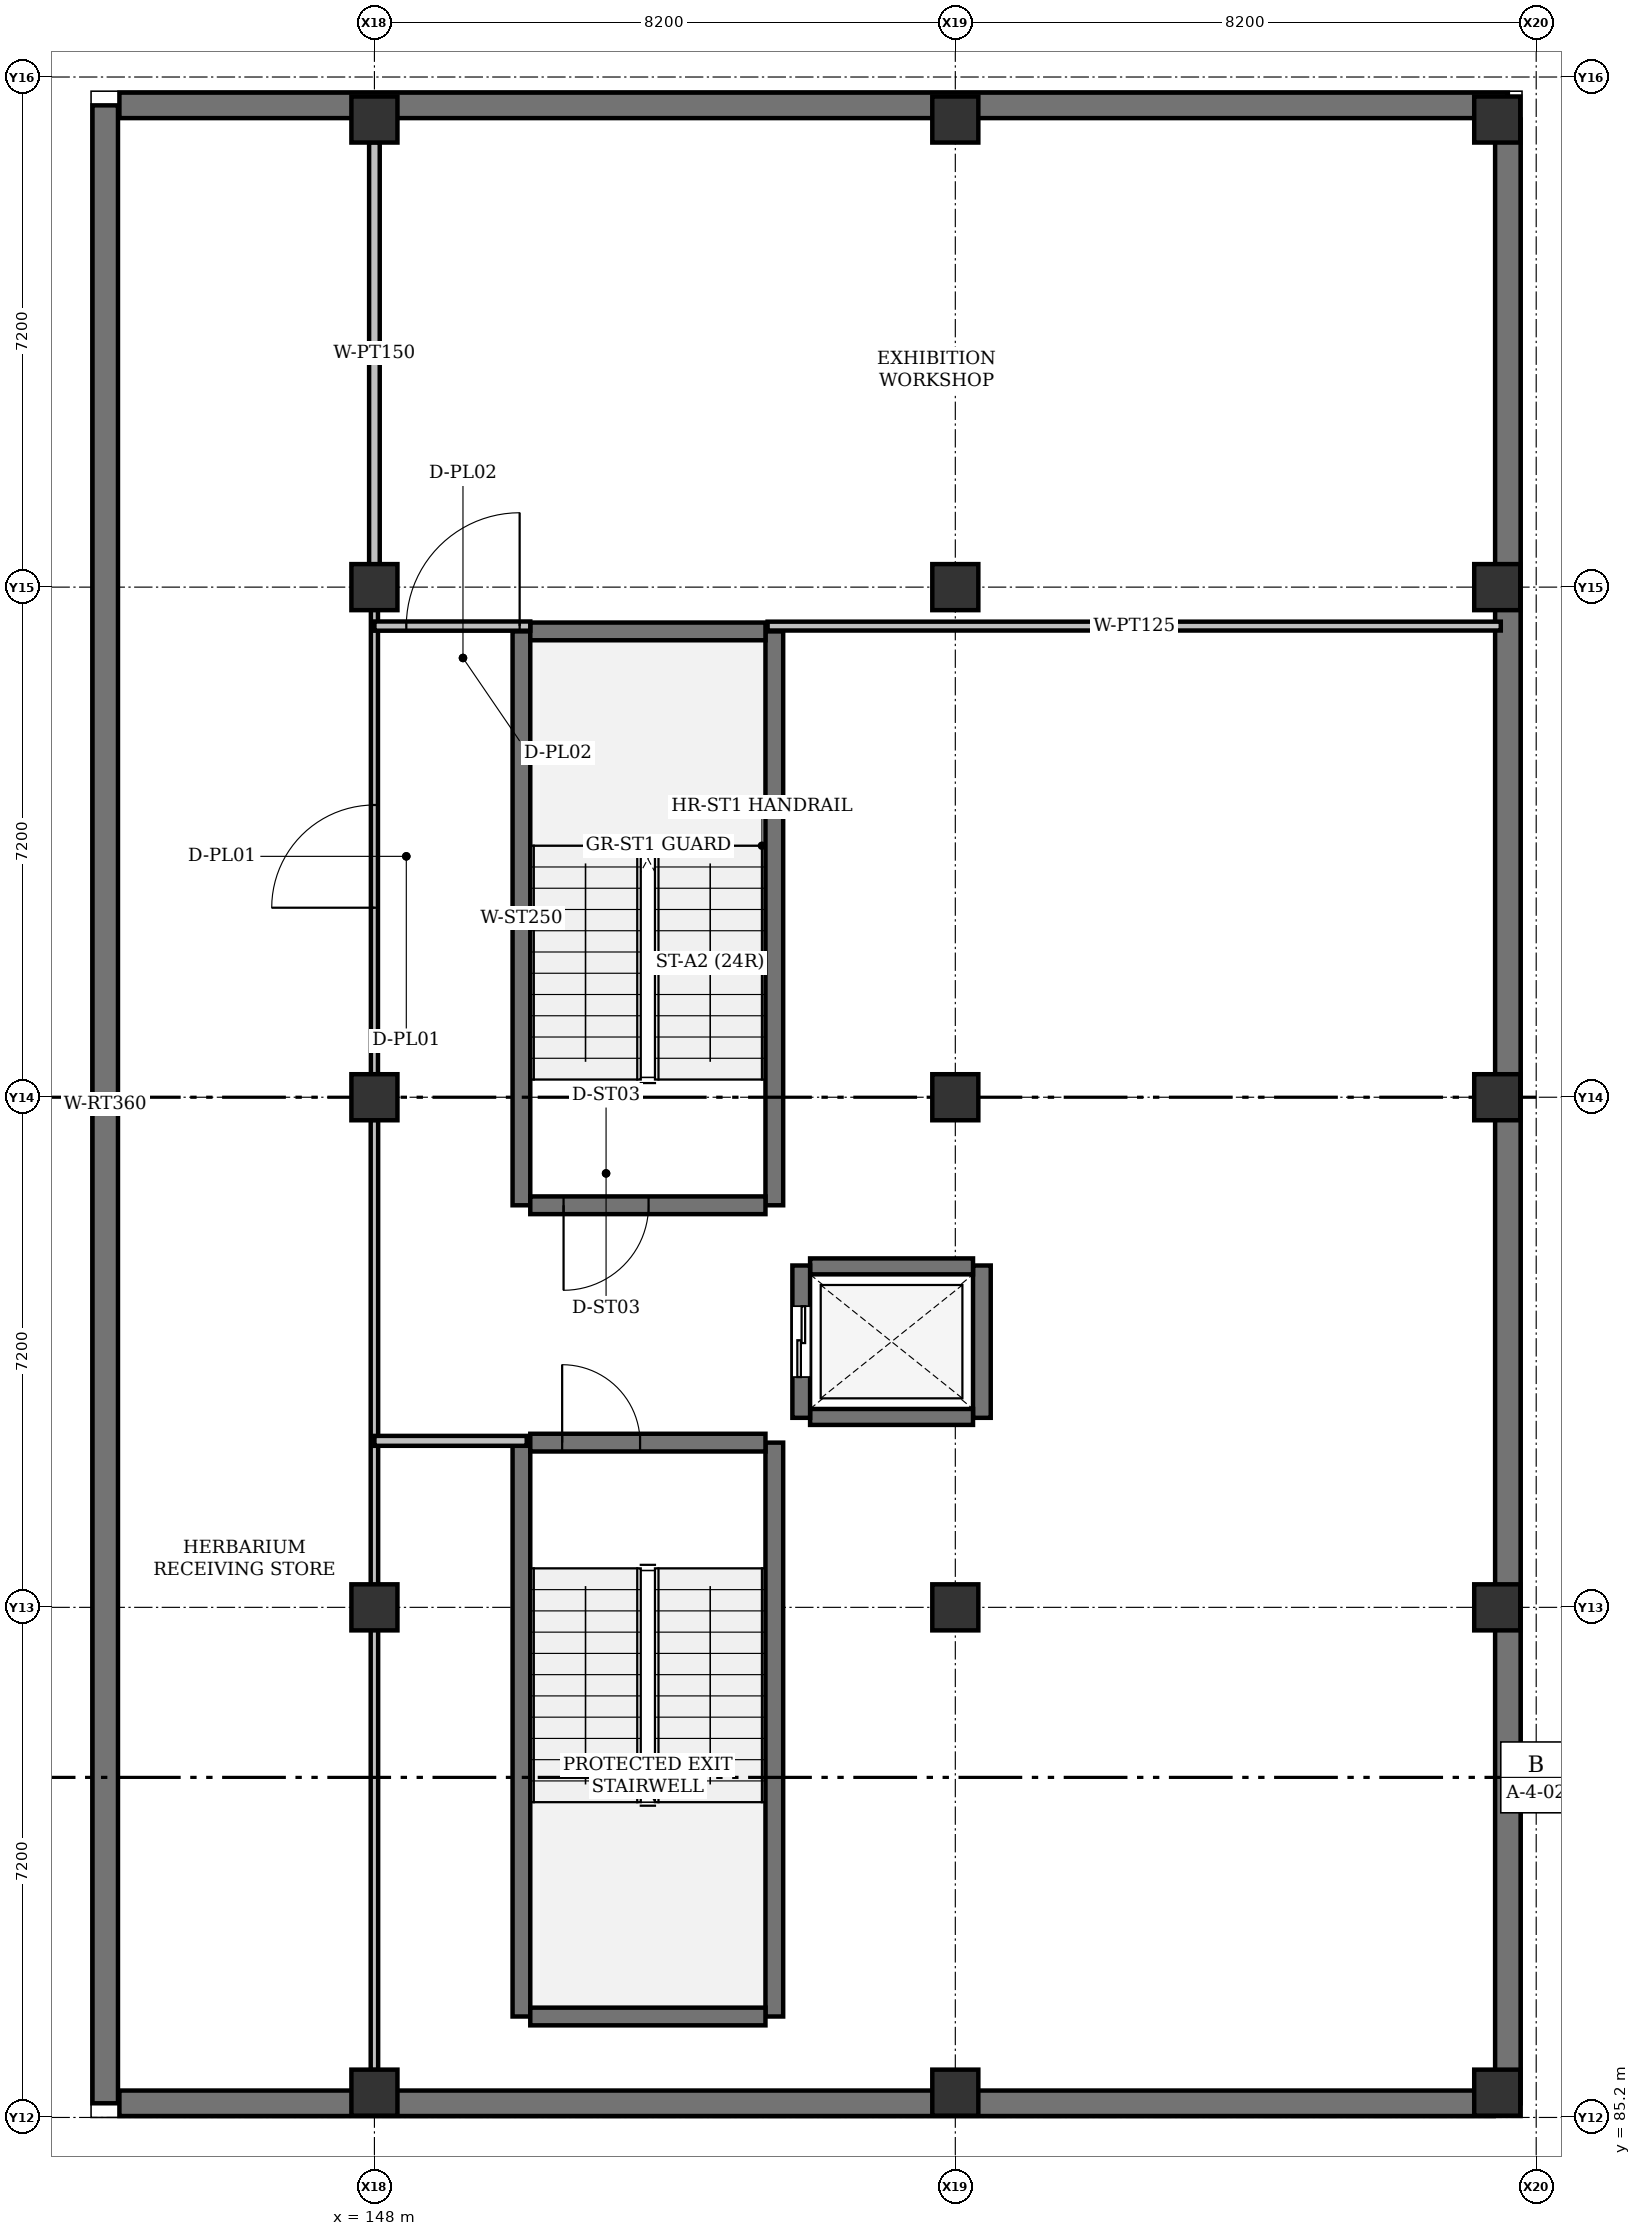
"""IFC4 building model, lengths in metres.
Left out: names, types, materials, properties, quantities, classifications, styles, units other than length and angle.
Written with IfcOpenShell. Run it as: python <this file> out.ifc"""

import sys

from ifc_helpers import new_model, si_unit, direction, frame, frame_2d, origin, origin_2d, place, context, subcontext, project, spatial, rectangle, extrude, element, fill, save


model = new_model("IFC4")
c1 = context("Model", 3, precision=1e-05, world=origin(), true_north=direction((0.0, 1.0)))
c2 = subcontext(c1, "Body", "Model", "MODEL_VIEW")
j1 = project(units=[si_unit("LENGTHUNIT", "METRE"), si_unit("PLANEANGLEUNIT", "RADIAN")], contexts=[c1])
p1 = place(None, origin())
s1 = spatial("IfcSite", under=j1, at=p1, CompositionType="ELEMENT")
p2 = place(p1, origin())
s2 = spatial("IfcBuilding", under=s1, at=p2, CompositionType="ELEMENT")
p3 = place(p2, frame((0.0, 0.0, -4.2)))
s3 = spatial("IfcBuildingStorey", under=s2, at=p3, CompositionType="ELEMENT", Elevation=-4.2)
for number, where, z_axis, x_axis in (
    (1, (148.0, 85.55, 0.0), (0.0, 0.0, 1.0), (1.0, 0.0, 0.0)),
    (2, (148.0, 92.4, 0.0), (0.0, 0.0, 1.0), (1.0, 0.0, 0.0)),
    (3, (148.0, 99.6, 0.0), (0.0, 0.0, 1.0), (1.0, 0.0, 0.0)),
    (4, (148.0, 106.8, 0.0), (0.0, 0.0, 1.0), (1.0, 0.0, 0.0)),
    (5, (148.0, 113.4, 0.0), (0.0, 0.0, 1.0), (1.0, 0.0, 0.0)),
    (6, (156.2, 85.55, 0.0), (0.0, 0.0, 1.0), (1.0, 0.0, 0.0)),
    (7, (156.2, 92.4, 0.0), (0.0, 0.0, 1.0), (1.0, 0.0, 0.0)),
    (8, (156.2, 99.6, 0.0), (0.0, 0.0, 1.0), (1.0, 0.0, 0.0)),
    (9, (156.2, 106.8, 0.0), (0.0, 0.0, 1.0), (1.0, 0.0, 0.0)),
    (10, (156.2, 113.4, 0.0), (0.0, 0.0, 1.0), (1.0, 0.0, 0.0)),
    (11, (163.85, 85.55, 0.0), (0.0, 0.0, 1.0), (1.0, 0.0, 0.0)),
    (12, (163.85, 92.4, 0.0), (0.0, 0.0, 1.0), (1.0, 0.0, 0.0)),
    (13, (163.85, 99.6, 0.0), (0.0, 0.0, 1.0), (1.0, 0.0, 0.0)),
    (14, (163.85, 106.8, 0.0), (0.0, 0.0, 1.0), (1.0, 0.0, 0.0)),
    (15, (163.85, 113.4, 0.0), (0.0, 0.0, 1.0), (1.0, 0.0, 0.0)),
):
    element("IfcColumn", number, at=place(p3, frame(where, z_axis=z_axis, x_axis=x_axis)), inside=s3, PredefinedType="COLUMN", context=c2, shape_type="SweptSolid", body=[
        extrude(rectangle(XDim=0.65, YDim=0.65, at=origin_2d()), origin(), (0.0, 0.0, 1.0), 4.2),
    ])
p4 = place(p3, frame((144.2, 85.4, 0.0), z_axis=(0.0, 0.0, 1.0), x_axis=(0.0, 1.0, 0.0)))
e16 = element("IfcWall", 16, at=p4, inside=s3, PredefinedType="USERDEFINED", context=c2, shape_type="SweptSolid", body=[
    extrude(rectangle(XDim=28.2, YDim=0.36, at=frame_2d((14.1, 0.0))), origin(), (0.0, 0.0, 1.0), 3.95),
])
p5 = place(p3, frame((144.4, 113.6, 0.0), z_axis=(0.0, 0.0, 1.0), x_axis=(1.0, 0.0, 0.0)))
e17 = element("IfcWall", 17, at=p5, inside=s3, PredefinedType="USERDEFINED", context=c2, shape_type="SweptSolid", body=[
    extrude(rectangle(XDim=19.6, YDim=0.36, at=frame_2d((9.8, 0.0))), origin(), (0.0, 0.0, 1.0), 3.95),
])
p6 = place(p3, frame((164.0, 113.4, 0.0), z_axis=(0.0, 0.0, 1.0), x_axis=(0.0, -1.0, 0.0)))
e18 = element("IfcWall", 18, at=p6, inside=s3, PredefinedType="USERDEFINED", context=c2, shape_type="SweptSolid", body=[
    extrude(rectangle(XDim=28.0, YDim=0.36, at=frame_2d((14.0, 0.0))), origin(), (0.0, 0.0, 1.0), 3.95),
])
p7 = place(p3, frame((163.8, 85.4, 0.0), z_axis=(0.0, 0.0, 1.0), x_axis=(-1.0, 0.0, 0.0)))
e19 = element("IfcWall", 19, at=p7, inside=s3, PredefinedType="USERDEFINED", context=c2, shape_type="SweptSolid", body=[
    extrude(rectangle(XDim=19.4, YDim=0.36, at=frame_2d((9.7, 0.0))), origin(), (0.0, 0.0, 1.0), 3.95),
])
for number, where, z_axis, x_axis in (
    (20, (150.075, 86.625, 0.0), (0.0, 0.0, 1.0), (0.0, 1.0, 0.0)),
    (21, (153.645, 86.625, 0.0), (0.0, 0.0, 1.0), (0.0, 1.0, 0.0)),
):
    element("IfcWall", number, at=place(p3, frame(where, z_axis=z_axis, x_axis=x_axis)), inside=s3, PredefinedType="SHEAR", context=c2, shape_type="SweptSolid", body=[
        extrude(rectangle(XDim=8.1, YDim=0.25, at=frame_2d((4.05, 0.0))), origin(), (0.0, 0.0, 1.0), 4.2),
    ])
p8 = place(p3, frame((150.2, 86.625, 0.0), z_axis=(0.0, 0.0, 1.0), x_axis=(1.0, 0.0, 0.0)))
e22 = element("IfcWall", 22, at=p8, inside=s3, PredefinedType="SHEAR", context=c2, shape_type="SweptSolid", body=[
    extrude(rectangle(XDim=3.32, YDim=0.25, at=frame_2d((1.66, 0.0))), origin(), (0.0, 0.0, 1.0), 4.2),
])
p9 = place(p3, frame((150.2, 94.725, 0.0), z_axis=(0.0, 0.0, 1.0), x_axis=(1.0, 0.0, 0.0)))
e23 = element("IfcWall", 23, at=p9, inside=s3, PredefinedType="SHEAR", context=c2, shape_type="SweptSolid", body=[
    extrude(rectangle(XDim=3.32, YDim=0.25, at=frame_2d((1.66, 0.0))), origin(), (0.0, 0.0, 1.0), 4.2),
])
p10 = place(p9, frame((0.45, 0.0, 0.0)))
e24 = element("IfcOpeningElement", 24, at=p10, cuts=e23, PredefinedType="OPENING", context=c2, shape_type="SweptSolid", body=[
    extrude(rectangle(XDim=1.1, YDim=2.15, at=frame_2d((0.55, 1.075))), frame((0.0, 0.125, 0.0), z_axis=(0.0, -1.0, 0.0), x_axis=(1.0, 0.0, 0.0)), (0.0, 0.0, 1.0), 0.25),
])
for number, where, z_axis, x_axis in (
    (25, (150.075, 98.075, 0.0), (0.0, 0.0, 1.0), (0.0, 1.0, 0.0)),
    (26, (153.645, 98.075, 0.0), (0.0, 0.0, 1.0), (0.0, 1.0, 0.0)),
):
    element("IfcWall", number, at=place(p3, frame(where, z_axis=z_axis, x_axis=x_axis)), inside=s3, PredefinedType="SHEAR", context=c2, shape_type="SweptSolid", body=[
        extrude(rectangle(XDim=8.1, YDim=0.25, at=frame_2d((4.05, 0.0))), origin(), (0.0, 0.0, 1.0), 4.2),
    ])
p11 = place(p3, frame((150.2, 106.175, 0.0), z_axis=(0.0, 0.0, 1.0), x_axis=(1.0, 0.0, 0.0)))
e27 = element("IfcWall", 27, at=p11, inside=s3, PredefinedType="SHEAR", context=c2, shape_type="SweptSolid", body=[
    extrude(rectangle(XDim=3.32, YDim=0.25, at=frame_2d((1.66, 0.0))), origin(), (0.0, 0.0, 1.0), 4.2),
])
p12 = place(p3, frame((153.52, 98.075, 0.0), z_axis=(0.0, 0.0, 1.0), x_axis=(-1.0, 0.0, 0.0)))
e28 = element("IfcWall", 28, at=p12, inside=s3, PredefinedType="SHEAR", context=c2, shape_type="SweptSolid", body=[
    extrude(rectangle(XDim=3.32, YDim=0.25, at=frame_2d((1.66, 0.0))), origin(), (0.0, 0.0, 1.0), 4.2),
])
p13 = place(p12, frame((1.65, 0.0, 0.0)))
e29 = element("IfcOpeningElement", 29, at=p13, cuts=e28, PredefinedType="OPENING", context=c2, shape_type="SweptSolid", body=[
    extrude(rectangle(XDim=1.2, YDim=2.2, at=frame_2d((0.6, 1.1))), frame((0.0, 0.125, 0.0), z_axis=(0.0, -1.0, 0.0), x_axis=(1.0, 0.0, 0.0)), (0.0, 0.0, 1.0), 0.25),
])
p14 = place(p3, frame((156.575, 95.075, 0.0), z_axis=(0.0, 0.0, 1.0), x_axis=(0.0, 1.0, 0.0)))
e30 = element("IfcWall", 30, at=p14, inside=s3, PredefinedType="SHEAR", context=c2, shape_type="SweptSolid", body=[
    extrude(rectangle(XDim=2.15, YDim=0.25, at=frame_2d((1.075, 0.0))), origin(), (0.0, 0.0, 1.0), 4.2),
])
for number, where, z_axis, x_axis in (
    (31, (154.15, 95.087, 0.0), (0.0, 0.0, 1.0), (1.0, 0.0, 0.0)),
    (32, (154.15, 97.212, 0.0), (0.0, 0.0, 1.0), (1.0, 0.0, 0.0)),
):
    element("IfcWall", number, at=place(p3, frame(where, z_axis=z_axis, x_axis=x_axis)), inside=s3, PredefinedType="SHEAR", context=c2, shape_type="SweptSolid", body=[
        extrude(rectangle(XDim=2.3, YDim=0.225, at=frame_2d((1.15, 0.0))), origin(), (0.0, 0.0, 1.0), 4.2),
    ])
p15 = place(p3, frame((154.025, 95.075, 0.0), z_axis=(0.0, 0.0, 1.0), x_axis=(0.0, 1.0, 0.0)))
e33 = element("IfcWall", 33, at=p15, inside=s3, PredefinedType="SHEAR", context=c2, shape_type="SweptSolid", body=[
    extrude(rectangle(XDim=2.15, YDim=0.25, at=frame_2d((1.075, 0.0))), origin(), (0.0, 0.0, 1.0), 4.2),
])
p16 = place(p15, frame((0.575, 0.0, 0.0)))
e34 = element("IfcOpeningElement", 34, at=p16, cuts=e33, PredefinedType="OPENING", context=c2, shape_type="SweptSolid", body=[
    extrude(rectangle(XDim=1.0, YDim=2.1, at=frame_2d((0.5, 1.05))), frame((0.0, 0.125, 0.0), z_axis=(0.0, -1.0, 0.0), x_axis=(1.0, 0.0, 0.0)), (0.0, 0.0, 1.0), 0.25),
])
p17 = place(p3, frame((148.0, 85.87, 0.0), z_axis=(0.0, 0.0, 1.0), x_axis=(0.0, 1.0, 0.0)))
e35 = element("IfcWall", 35, at=p17, inside=s3, PredefinedType="PARTITIONING", context=c2, shape_type="SweptSolid", body=[
    extrude(rectangle(XDim=13.41, YDim=0.105, at=frame_2d((6.705, 0.0))), origin(), (0.0, 0.0, 1.0), 3.401),
])
p18 = place(p3, frame((148.0, 99.92, 0.0), z_axis=(0.0, 0.0, 1.0), x_axis=(0.0, 1.0, 0.0)))
e36 = element("IfcWall", 36, at=p18, inside=s3, PredefinedType="PARTITIONING", context=c2, shape_type="SweptSolid", body=[
    extrude(rectangle(XDim=6.56, YDim=0.1, at=frame_2d((3.28, 0.0))), origin(), (0.0, 0.0, 1.0), 3.401),
])
p19 = place(p18, frame((2.355, 0.0, 0.0)))
e37 = element("IfcOpeningElement", 37, at=p19, cuts=e36, PredefinedType="OPENING", context=c2, shape_type="SweptSolid", body=[
    extrude(rectangle(XDim=1.45, YDim=2.2, at=frame_2d((0.725, 1.1))), frame((0.0, 0.05, 0.0), z_axis=(0.0, -1.0, 0.0), x_axis=(1.0, 0.0, 0.0)), (0.0, 0.0, 1.0), 0.1),
])
p20 = place(p3, frame((148.0, 107.12, 0.0), z_axis=(0.0, 0.0, 1.0), x_axis=(0.0, 1.0, 0.0)))
e38 = element("IfcWall", 38, at=p20, inside=s3, PredefinedType="PARTITIONING", context=c2, shape_type="SweptSolid", body=[
    extrude(rectangle(XDim=5.96, YDim=0.15, at=frame_2d((2.98, 0.0))), origin(), (0.0, 0.0, 1.0), 3.401),
])
p21 = place(p3, frame((148.0, 94.75, 0.0), z_axis=(0.0, 0.0, 1.0), x_axis=(1.0, 0.0, 0.0)))
e39 = element("IfcWall", 39, at=p21, inside=s3, PredefinedType="PARTITIONING", context=c2, shape_type="SweptSolid", body=[
    extrude(rectangle(XDim=2.15, YDim=0.14, at=frame_2d((1.075, 0.0))), origin(), (0.0, 0.0, 1.0), 3.401),
])
p22 = place(p3, frame((148.0, 106.25, 0.0), z_axis=(0.0, 0.0, 1.0), x_axis=(1.0, 0.0, 0.0)))
e40 = element("IfcWall", 40, at=p22, inside=s3, PredefinedType="PARTITIONING", context=c2, shape_type="SweptSolid", body=[
    extrude(rectangle(XDim=2.2, YDim=0.13, at=frame_2d((1.1, 0.0))), origin(), (0.0, 0.0, 1.0), 3.401),
])
p23 = place(p22, frame((0.45, 0.0, 0.0)))
e41 = element("IfcOpeningElement", 41, at=p23, cuts=e40, PredefinedType="OPENING", context=c2, shape_type="SweptSolid", body=[
    extrude(rectangle(XDim=1.6, YDim=2.25, at=frame_2d((0.8, 1.125))), frame((0.0, 0.065, 0.0), z_axis=(0.0, -1.0, 0.0), x_axis=(1.0, 0.0, 0.0)), (0.0, 0.0, 1.0), 0.13),
])
p24 = place(p3, frame((153.55, 106.25, 0.0), z_axis=(0.0, 0.0, 1.0), x_axis=(1.0, 0.0, 0.0)))
e42 = element("IfcWall", 42, at=p24, inside=s3, PredefinedType="PARTITIONING", context=c2, shape_type="SweptSolid", body=[
    extrude(rectangle(XDim=10.35, YDim=0.125, at=frame_2d((5.175, 0.0))), origin(), (0.0, 0.0, 1.0), 3.401),
])
p25 = place(p10, origin())
e43 = element("IfcDoor", 43, at=p25, inside=s3, OperationType="SINGLE_SWING_LEFT", PredefinedType="DOOR", context=c2, shape_type="SweptSolid", body=[
    extrude(rectangle(XDim=1.1, YDim=2.15, at=frame_2d((0.55, 1.075))), frame((0.0, 0.025, 0.0), z_axis=(0.0, -1.0, 0.0), x_axis=(1.0, 0.0, 0.0)), (0.0, 0.0, 1.0), 0.05),
])
fill(e24, e43)
p26 = place(p13, origin())
e44 = element("IfcDoor", 44, at=p26, inside=s3, OperationType="SINGLE_SWING_RIGHT", PredefinedType="DOOR", context=c2, shape_type="SweptSolid", body=[
    extrude(rectangle(XDim=1.2, YDim=2.2, at=frame_2d((0.6, 1.1))), frame((0.0, 0.025, 0.0), z_axis=(0.0, -1.0, 0.0), x_axis=(1.0, 0.0, 0.0)), (0.0, 0.0, 1.0), 0.05),
])
fill(e29, e44)
p27 = place(p16, origin())
e45 = element("IfcDoor", 45, at=p27, inside=s3, OperationType="SLIDING_TO_LEFT", PredefinedType="DOOR", context=c2, shape_type="SweptSolid", body=[
    extrude(rectangle(XDim=1.0, YDim=2.1, at=frame_2d((0.5, 1.05))), frame((0.0, 0.025, 0.0), z_axis=(0.0, -1.0, 0.0), x_axis=(1.0, 0.0, 0.0)), (0.0, 0.0, 1.0), 0.05),
])
fill(e34, e45)
p28 = place(p19, origin())
e46 = element("IfcDoor", 46, at=p28, inside=s3, OperationType="SINGLE_SWING_LEFT", PredefinedType="DOOR", context=c2, shape_type="SweptSolid", body=[
    extrude(rectangle(XDim=1.45, YDim=2.2, at=frame_2d((0.725, 1.1))), frame((0.0, 0.025, 0.0), z_axis=(0.0, -1.0, 0.0), x_axis=(1.0, 0.0, 0.0)), (0.0, 0.0, 1.0), 0.05),
])
fill(e37, e46)
p29 = place(p23, origin())
e47 = element("IfcDoor", 47, at=p29, inside=s3, OperationType="SINGLE_SWING_RIGHT", PredefinedType="DOOR", context=c2, shape_type="SweptSolid", body=[
    extrude(rectangle(XDim=1.6, YDim=2.25, at=frame_2d((0.8, 1.125))), frame((0.0, 0.025, 0.0), z_axis=(0.0, -1.0, 0.0), x_axis=(1.0, 0.0, 0.0)), (0.0, 0.0, 1.0), 0.05),
])
fill(e41, e47)
save(model, sys.argv[1])
